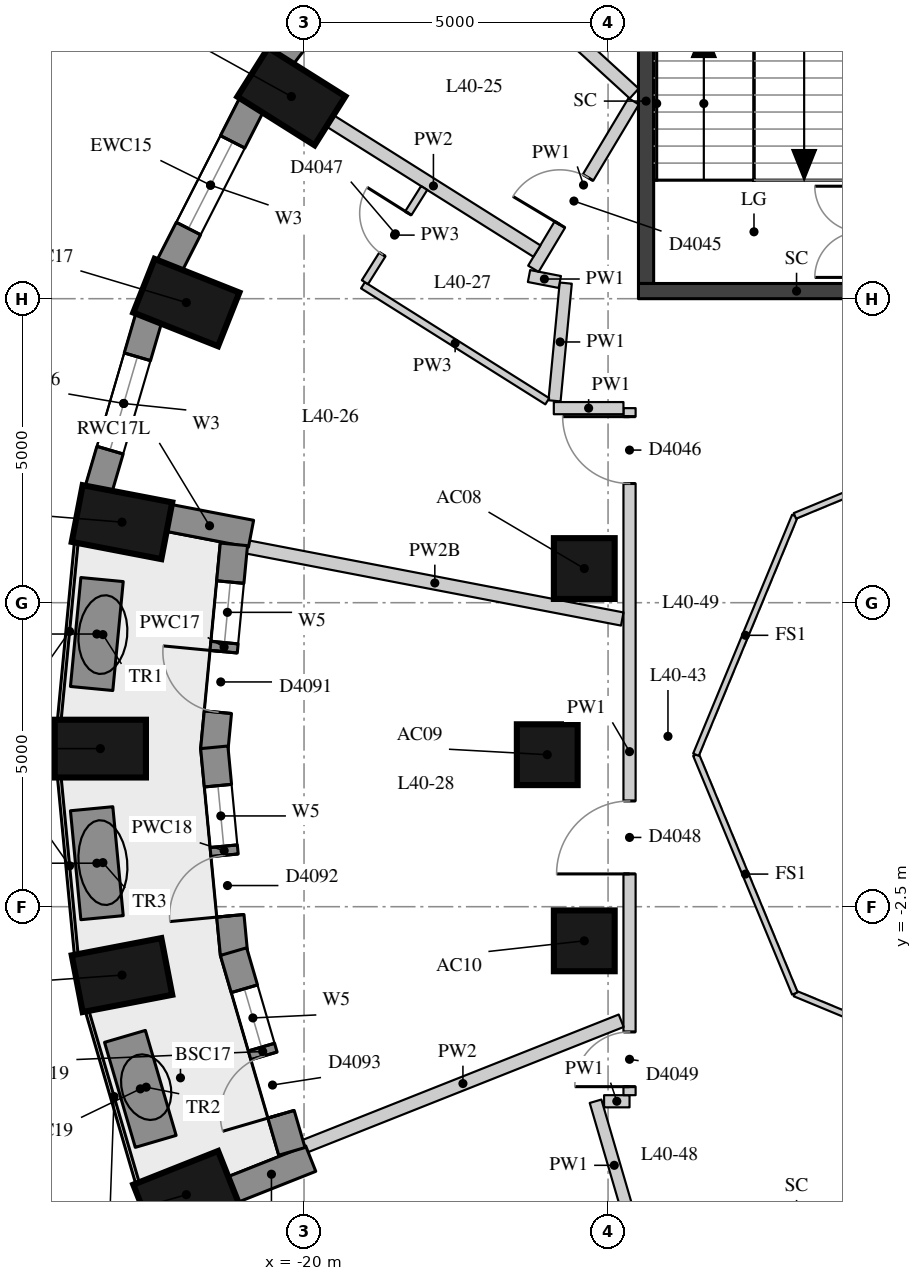
"""IFC4 building model, lengths in metres.
Left out: names, types, materials, properties, quantities, classifications, styles, units other than length and angle.
Written with IfcOpenShell. Run it as: python <this file> out.ifc"""

import sys

from ifc_helpers import new_model, si_unit, direction, frame, frame_2d, origin, origin_2d, place, context, subcontext, project, spatial, rectangle, extrude, element, fill, save


model = new_model("IFC4")
c1 = context("Model", 3, precision=1e-05, world=origin(), true_north=direction((0.0, 1.0)))
c2 = subcontext(c1, "Body", "Model", "MODEL_VIEW")
j1 = project(units=[si_unit("LENGTHUNIT", "METRE"), si_unit("PLANEANGLEUNIT", "RADIAN")], contexts=[c1])
p1 = place(None, origin())
s1 = spatial("IfcSite", under=j1, at=p1, CompositionType="ELEMENT")
p2 = place(p1, origin())
s2 = spatial("IfcBuilding", under=s1, at=p2, CompositionType="ELEMENT")
p3 = place(p2, frame((0.0, 0.0, 145.1)))
s3 = spatial("IfcBuildingStorey", under=s2, at=p3, CompositionType="ELEMENT", Elevation=145.1)
for number, where, z_axis, x_axis in (
    (1, (-20.208, 10.825, 0.0), (0.0, 0.0, 1.0), (-0.846, 0.533, 0.0)),
    (2, (-21.936, 7.436, 0.0), (0.0, 0.0, 1.0), (-0.93, 0.369, 0.0)),
    (3, (-22.994, 3.825, 0.0), (0.0, 0.0, 1.0), (-0.982, 0.189, 0.0)),
    (4, (-23.35, 0.1, 0.0), (0.0, 0.0, 1.0), (-1.0, 0.0, 0.0)),
    (5, (-22.994, -3.625, 0.0), (0.0, 0.0, 1.0), (-0.982, -0.189, 0.0)),
    (6, (-21.936, -7.236, 0.0), (0.0, 0.0, 1.0), (-0.93, -0.369, 0.0)),
):
    element("IfcColumn", number, at=place(p3, frame(where, z_axis=z_axis, x_axis=x_axis)), inside=s3, PredefinedType="COLUMN", context=c2, shape_type="SweptSolid", body=[
        extrude(rectangle(XDim=1.5, YDim=0.95, at=origin_2d()), origin(), (0.0, 0.0, 1.0), 3.3),
    ])
for number, where, z_axis, x_axis in (
    (7, (-15.391, 3.062, 0.0), (0.0, 0.0, 1.0), (1.0, 0.0, 0.0)),
    (8, (-16.0, 0.0, 0.0), (0.0, 0.0, 1.0), (1.0, 0.0, 0.0)),
    (9, (-15.391, -3.062, 0.0), (0.0, 0.0, 1.0), (1.0, 0.0, 0.0)),
):
    element("IfcColumn", number, at=place(p3, frame(where, z_axis=z_axis, x_axis=x_axis)), inside=s3, PredefinedType="COLUMN", context=c2, shape_type="SweptSolid", body=[
        extrude(rectangle(XDim=1.0, YDim=1.0, at=origin_2d()), origin(), (0.0, 0.0, 1.0), 3.3),
    ])
p4 = place(p3, frame((-18.528, 13.879, 0.0), z_axis=(0.0, 0.0, 1.0), x_axis=(-0.607817056371, -0.794077090706, 0.0)))
e10 = element("IfcWall", 10, at=p4, inside=s3, PredefinedType="SOLIDWALL", context=c2, shape_type="SweptSolid", body=[
    extrude(rectangle(XDim=3.037, YDim=0.45, at=frame_2d((1.519, 0.0))), origin(), (0.0, 0.0, 1.0), 3.02),
])
p5 = place(p4, frame((0.719, 0.0, 0.4)))
e11 = element("IfcOpeningElement", 11, at=p5, cuts=e10, PredefinedType="OPENING", context=c2, shape_type="SweptSolid", body=[
    extrude(rectangle(XDim=1.6, YDim=1.75, at=frame_2d((0.8, 0.875))), frame((0.0, 0.235, 0.0), z_axis=(0.0, -1.0, 0.0), x_axis=(1.0, 0.0, 0.0)), (0.0, 0.0, 1.0), 0.47),
])
p6 = place(p3, frame((-20.859, 10.697, 0.0), z_axis=(0.0, 0.0, 1.0), x_axis=(-0.454133999889, -0.890933392653, 0.0)))
e12 = element("IfcWall", 12, at=p6, inside=s3, PredefinedType="SOLIDWALL", context=c2, shape_type="SweptSolid", body=[
    extrude(rectangle(XDim=2.986, YDim=0.45, at=frame_2d((1.493, 0.0))), origin(), (0.0, 0.0, 1.0), 3.02),
])
p7 = place(p6, frame((0.693, 0.0, 0.4)))
e13 = element("IfcOpeningElement", 13, at=p7, cuts=e12, PredefinedType="OPENING", context=c2, shape_type="SweptSolid", body=[
    extrude(rectangle(XDim=1.6, YDim=1.75, at=frame_2d((0.8, 0.875))), frame((0.0, 0.235, 0.0), z_axis=(0.0, -1.0, 0.0), x_axis=(1.0, 0.0, 0.0)), (0.0, 0.0, 1.0), 0.47),
])
p8 = place(p3, frame((-22.551, 7.191, 0.0), z_axis=(0.0, 0.0, 1.0), x_axis=(-0.281125768296, -0.959670934435, 0.0)))
e14 = element("IfcWall", 14, at=p8, inside=s3, PredefinedType="SOLIDWALL", context=c2, shape_type="SweptSolid", body=[
    extrude(rectangle(XDim=2.948, YDim=0.45, at=frame_2d((1.474, 0.0))), origin(), (0.0, 0.0, 1.0), 3.02),
])
p9 = place(p8, frame((0.674, 0.0, 0.4)))
e15 = element("IfcOpeningElement", 15, at=p9, cuts=e14, PredefinedType="OPENING", context=c2, shape_type="SweptSolid", body=[
    extrude(rectangle(XDim=1.6, YDim=1.75, at=frame_2d((0.8, 0.875))), frame((0.0, 0.235, 0.0), z_axis=(0.0, -1.0, 0.0), x_axis=(1.0, 0.0, 0.0)), (0.0, 0.0, 1.0), 0.47),
])
p10 = place(p3, frame((-22.237, 3.896, 0.0), z_axis=(0.0, 0.0, 1.0), x_axis=(0.98204526411, -0.188645432598, 0.0)))
e16 = element("IfcWall", 16, at=p10, inside=s3, PredefinedType="SOLIDWALL", context=c2, shape_type="SweptSolid", body=[
    extrude(rectangle(XDim=1.39, YDim=0.45, at=frame_2d((0.695, 0.0))), origin(), (0.0, 0.0, 1.0), 2.57),
])
p11 = place(p3, frame((-21.182, -7.156, 0.0), z_axis=(0.0, 0.0, 1.0), x_axis=(0.929514600716, 0.368785312961, 0.0)))
e17 = element("IfcWall", 17, at=p11, inside=s3, PredefinedType="SOLIDWALL", context=c2, shape_type="SweptSolid", body=[
    extrude(rectangle(XDim=1.39, YDim=0.45, at=frame_2d((0.695, 0.0))), origin(), (0.0, 0.0, 1.0), 3.02),
])
p12 = place(p3, frame((-21.154, 3.459, 0.0), z_axis=(0.0, 0.0, 1.0), x_axis=(-0.094968544931, -0.995480273774, 0.0)))
e18 = element("IfcWall", 18, at=p12, inside=s3, PredefinedType="SOLIDWALL", context=c2, shape_type="SweptSolid", body=[
    extrude(rectangle(XDim=3.396, YDim=0.45, at=frame_2d((1.698, 0.0))), origin(), (0.0, 0.0, 1.0), 3.02),
])
p13 = place(p12, frame((0.623, 0.0, 0.4)))
e19 = element("IfcOpeningElement", 19, at=p13, cuts=e18, PredefinedType="OPENING", context=c2, shape_type="SweptSolid", body=[
    extrude(rectangle(XDim=1.0, YDim=1.75, at=frame_2d((0.5, 0.875))), frame((0.0, 0.235, 0.0), z_axis=(0.0, -1.0, 0.0), x_axis=(1.0, 0.0, 0.0)), (0.0, 0.0, 1.0), 0.47),
])
p14 = place(p12, frame((1.773, 0.0, 0.0)))
e20 = element("IfcOpeningElement", 20, at=p14, cuts=e18, PredefinedType="OPENING", context=c2, shape_type="SweptSolid", body=[
    extrude(rectangle(XDim=1.0, YDim=2.15, at=frame_2d((0.5, 1.075))), frame((0.0, 0.235, 0.0), z_axis=(0.0, -1.0, 0.0), x_axis=(1.0, 0.0, 0.0)), (0.0, 0.0, 1.0), 0.47),
])
p15 = place(p3, frame((-21.476, 0.121, 0.0), z_axis=(0.0, 0.0, 1.0), x_axis=(0.094947321258, -0.995482298279, 0.0)))
e21 = element("IfcWall", 21, at=p15, inside=s3, PredefinedType="SOLIDWALL", context=c2, shape_type="SweptSolid", body=[
    extrude(rectangle(XDim=3.417, YDim=0.45, at=frame_2d((1.708, 0.0))), origin(), (0.0, 0.0, 1.0), 3.02),
])
p16 = place(p15, frame((0.634, 0.0, 0.4)))
e22 = element("IfcOpeningElement", 22, at=p16, cuts=e21, PredefinedType="OPENING", context=c2, shape_type="SweptSolid", body=[
    extrude(rectangle(XDim=1.0, YDim=1.75, at=frame_2d((0.5, 0.875))), frame((0.0, 0.235, 0.0), z_axis=(0.0, -1.0, 0.0), x_axis=(1.0, 0.0, 0.0)), (0.0, 0.0, 1.0), 0.47),
])
p17 = place(p15, frame((1.784, 0.0, 0.0)))
e23 = element("IfcOpeningElement", 23, at=p17, cuts=e21, PredefinedType="OPENING", context=c2, shape_type="SweptSolid", body=[
    extrude(rectangle(XDim=1.0, YDim=2.15, at=frame_2d((0.5, 1.075))), frame((0.0, 0.235, 0.0), z_axis=(0.0, -1.0, 0.0), x_axis=(1.0, 0.0, 0.0)), (0.0, 0.0, 1.0), 0.47),
])
p18 = place(p3, frame((-21.159, -3.239, 0.0), z_axis=(0.0, 0.0, 1.0), x_axis=(0.280377942886, -0.959889685924, 0.0)))
e24 = element("IfcWall", 24, at=p18, inside=s3, PredefinedType="SOLIDWALL", context=c2, shape_type="SweptSolid", body=[
    extrude(rectangle(XDim=3.423, YDim=0.45, at=frame_2d((1.711, 0.0))), origin(), (0.0, 0.0, 1.0), 3.02),
])
p19 = place(p18, frame((0.636, 0.0, 0.4)))
e25 = element("IfcOpeningElement", 25, at=p19, cuts=e24, PredefinedType="OPENING", context=c2, shape_type="SweptSolid", body=[
    extrude(rectangle(XDim=1.0, YDim=1.75, at=frame_2d((0.5, 0.875))), frame((0.0, 0.235, 0.0), z_axis=(0.0, -1.0, 0.0), x_axis=(1.0, 0.0, 0.0)), (0.0, 0.0, 1.0), 0.47),
])
p20 = place(p18, frame((1.786, 0.0, 0.0)))
e26 = element("IfcOpeningElement", 26, at=p20, cuts=e24, PredefinedType="OPENING", context=c2, shape_type="SweptSolid", body=[
    extrude(rectangle(XDim=1.0, YDim=2.15, at=frame_2d((0.5, 1.075))), frame((0.0, 0.235, 0.0), z_axis=(0.0, -1.0, 0.0), x_axis=(1.0, 0.0, 0.0)), (0.0, 0.0, 1.0), 0.47),
])
for number, where, z_axis, x_axis in (
    (27, (-23.322, 2.881, 0.0), (0.0, 0.0, 1.0), (-0.095, -0.995, 0.0)),
    (28, (-23.493, -0.889, 0.0), (0.0, 0.0, 1.0), (0.095, -0.995, 0.0)),
    (29, (-22.945, -4.633, 0.0), (0.0, 0.0, 1.0), (0.281, -0.96, 0.0)),
):
    element("IfcWall", number, at=place(p3, frame(where, z_axis=z_axis, x_axis=x_axis)), inside=s3, PredefinedType="USERDEFINED", context=c2, shape_type="SweptSolid", body=[
        extrude(rectangle(XDim=1.8, YDim=0.7, at=frame_2d((0.9, 0.0))), origin(), (0.0, 0.0, 1.0), 0.75),
    ])
p21 = place(p3, frame((-14.375, 7.75, -0.28), z_axis=(0.0, 0.0, 1.0), x_axis=(0.0, 1.0, 0.0)))
e30 = element("IfcWall", 30, at=p21, inside=s3, PredefinedType="SHEAR", context=c2, shape_type="SweptSolid", body=[
    extrude(rectangle(XDim=6.0, YDim=0.25, at=frame_2d((3.0, 0.0))), origin(), (0.0, 0.0, 1.0), 3.3),
])
p22 = place(p3, frame((-14.5, 7.625, -0.28), z_axis=(0.0, 0.0, 1.0), x_axis=(1.0, 0.0, 0.0)))
e31 = element("IfcWall", 31, at=p22, inside=s3, PredefinedType="SHEAR", context=c2, shape_type="SweptSolid", body=[
    extrude(rectangle(XDim=5.2, YDim=0.25, at=frame_2d((2.6, 0.0))), origin(), (0.0, 0.0, 1.0), 3.3),
])
p23 = place(p3, frame((-14.59, -7.807, 0.0), z_axis=(0.0, 0.0, 1.0), x_axis=(-0.280401457903, 0.959882817018, 0.0)))
e32 = element("IfcWall", 32, at=p23, inside=s3, PredefinedType="PARTITIONING", context=c2, shape_type="SweptSolid", body=[
    extrude(rectangle(XDim=2.195, YDim=0.2, at=frame_2d((1.098, 0.0))), origin(), (0.0, 0.0, 1.0), 3.02),
])
p24 = place(p3, frame((-15.065, -5.7, 0.0), z_axis=(0.0, 0.0, 1.0), x_axis=(1.0, 0.0, 0.0)))
e33 = element("IfcWall", 33, at=p24, inside=s3, PredefinedType="PARTITIONING", context=c2, shape_type="SweptSolid", body=[
    extrude(rectangle(XDim=0.419, YDim=0.2, at=frame_2d((0.209, 0.0))), origin(), (0.0, 0.0, 1.0), 3.02),
])
p25 = place(p3, frame((-14.647, -5.6, 0.0), z_axis=(0.0, 0.0, 1.0), x_axis=(0.0, 1.0, 0.0)))
e34 = element("IfcWall", 34, at=p25, inside=s3, PredefinedType="PARTITIONING", context=c2, shape_type="SweptSolid", body=[
    extrude(rectangle(XDim=11.3, YDim=0.2, at=frame_2d((5.65, 0.0))), origin(), (0.0, 0.0, 1.0), 3.02),
])
p26 = place(p25, frame((10.06, 0.0, 0.0)))
e35 = element("IfcOpeningElement", 35, at=p26, cuts=e34, PredefinedType="OPENING", context=c2, shape_type="SweptSolid", body=[
    extrude(rectangle(XDim=1.1, YDim=2.1, at=frame_2d((0.55, 1.05))), frame((0.0, 0.11, 0.0), z_axis=(0.0, -1.0, 0.0), x_axis=(1.0, 0.0, 0.0)), (0.0, 0.0, 1.0), 0.22),
])
p27 = place(p25, frame((3.639, 0.0, 0.0)))
e36 = element("IfcOpeningElement", 36, at=p27, cuts=e34, PredefinedType="OPENING", context=c2, shape_type="SweptSolid", body=[
    extrude(rectangle(XDim=1.2, YDim=2.1, at=frame_2d((0.6, 1.05))), frame((0.0, 0.11, 0.0), z_axis=(0.0, -1.0, 0.0), x_axis=(1.0, 0.0, 0.0)), (0.0, 0.0, 1.0), 0.22),
])
p28 = place(p25, frame((0.14, 0.0, 0.0)))
e37 = element("IfcOpeningElement", 37, at=p28, cuts=e34, PredefinedType="OPENING", context=c2, shape_type="SweptSolid", body=[
    extrude(rectangle(XDim=0.9, YDim=2.1, at=frame_2d((0.45, 1.05))), frame((0.0, 0.11, 0.0), z_axis=(0.0, -1.0, 0.0), x_axis=(1.0, 0.0, 0.0)), (0.0, 0.0, 1.0), 0.22),
])
p29 = place(p3, frame((-14.747, 5.7, 0.0), z_axis=(0.0, 0.0, 1.0), x_axis=(-1.0, 0.0, 0.0)))
e38 = element("IfcWall", 38, at=p29, inside=s3, PredefinedType="PARTITIONING", context=c2, shape_type="SweptSolid", body=[
    extrude(rectangle(XDim=1.145, YDim=0.2, at=frame_2d((0.573, 0.0))), origin(), (0.0, 0.0, 1.0), 3.02),
])
p30 = place(p3, frame((-15.88, 5.82, 0.0), z_axis=(0.0, 0.0, 1.0), x_axis=(0.094892019157, 0.995487571344, 0.0)))
e39 = element("IfcWall", 39, at=p30, inside=s3, PredefinedType="PARTITIONING", context=c2, shape_type="SweptSolid", body=[
    extrude(rectangle(XDim=1.945, YDim=0.2, at=frame_2d((0.973, 0.0))), origin(), (0.0, 0.0, 1.0), 3.02),
])
p31 = place(p3, frame((-15.793, 7.775, 0.0), z_axis=(0.0, 0.0, 1.0), x_axis=(-0.981833914825, 0.189742361371, 0.0)))
e40 = element("IfcWall", 40, at=p31, inside=s3, PredefinedType="PARTITIONING", context=c2, shape_type="SweptSolid", body=[
    extrude(rectangle(XDim=0.516, YDim=0.2, at=frame_2d((0.258, 0.0))), origin(), (0.0, 0.0, 1.0), 3.02),
])
p32 = place(p3, frame((-16.228, 7.992, 0.0), z_axis=(0.0, 0.0, 1.0), x_axis=(0.513936465122, 0.857828251935, 0.0)))
e41 = element("IfcWall", 41, at=p32, inside=s3, PredefinedType="PARTITIONING", context=c2, shape_type="SweptSolid", body=[
    extrude(rectangle(XDim=3.21, YDim=0.2, at=frame_2d((1.605, 0.0))), origin(), (0.0, 0.0, 1.0), 3.02),
])
p33 = place(p32, frame((0.848, 0.0, 0.0)))
e42 = element("IfcOpeningElement", 42, at=p33, cuts=e41, PredefinedType="OPENING", context=c2, shape_type="SweptSolid", body=[
    extrude(rectangle(XDim=0.9, YDim=2.1, at=frame_2d((0.45, 1.05))), frame((0.0, 0.11, 0.0), z_axis=(0.0, -1.0, 0.0), x_axis=(1.0, 0.0, 0.0)), (0.0, 0.0, 1.0), 0.22),
])
p34 = place(p3, frame((-17.31, 13.382, 0.0), z_axis=(0.0, 0.0, 1.0), x_axis=(0.737860436015, -0.674953314655, 0.0)))
e43 = element("IfcWall", 43, at=p34, inside=s3, PredefinedType="PARTITIONING", context=c2, shape_type="SweptSolid", body=[
    extrude(rectangle(XDim=3.714, YDim=0.22, at=frame_2d((1.857, 0.0))), origin(), (0.0, 0.0, 1.0), 3.02),
])
p35 = place(p3, frame((-19.573, 10.426, 0.0), z_axis=(0.0, 0.0, 1.0), x_axis=(0.846298736827, -0.532708595805, 0.0)))
e44 = element("IfcWall", 44, at=p35, inside=s3, PredefinedType="PARTITIONING", context=c2, shape_type="SweptSolid", body=[
    extrude(rectangle(XDim=4.021, YDim=0.22, at=frame_2d((2.011, 0.0))), origin(), (0.0, 0.0, 1.0), 3.02),
])
p36 = place(p3, frame((-20.932, 3.417, 0.0), z_axis=(0.0, 0.0, 1.0), x_axis=(0.982023362662, -0.188759410856, 0.0)))
e45 = element("IfcWall", 45, at=p36, inside=s3, PredefinedType="PARTITIONING", context=c2, shape_type="SweptSolid", body=[
    extrude(rectangle(XDim=6.278, YDim=0.22, at=frame_2d((3.139, 0.0))), origin(), (0.0, 0.0, 1.0), 2.57),
])
p37 = place(p3, frame((-19.99, -6.441, 0.0), z_axis=(0.0, 0.0, 1.0), x_axis=(0.929507316491, 0.368803672147, 0.0)))
e46 = element("IfcWall", 46, at=p37, inside=s3, PredefinedType="PARTITIONING", context=c2, shape_type="SweptSolid", body=[
    extrude(rectangle(XDim=5.6, YDim=0.22, at=frame_2d((2.8, 0.0))), origin(), (0.0, 0.0, 1.0), 3.02),
])
p38 = place(p3, frame((-16.0, 5.813, 0.0), z_axis=(0.0, 0.0, 1.0), x_axis=(-0.846339825068, 0.53264331452, 0.0)))
e47 = element("IfcWall", 47, at=p38, inside=s3, PredefinedType="PARTITIONING", context=c2, shape_type="SweptSolid", body=[
    extrude(rectangle(XDim=3.582, YDim=0.12, at=frame_2d((1.791, 0.0))), origin(), (0.0, 0.0, 1.0), 3.02),
])
p39 = place(p3, frame((-18.999, 7.771, 0.0), z_axis=(0.0, 0.0, 1.0), x_axis=(0.532431076319, 0.84647335987, 0.0)))
e48 = element("IfcWall", 48, at=p39, inside=s3, PredefinedType="PARTITIONING", context=c2, shape_type="SweptSolid", body=[
    extrude(rectangle(XDim=1.83, YDim=0.12, at=frame_2d((0.915, 0.0))), origin(), (0.0, 0.0, 1.0), 3.02),
])
p40 = place(p39, frame((0.54, 0.0, 0.0)))
e49 = element("IfcOpeningElement", 49, at=p40, cuts=e48, PredefinedType="OPENING", context=c2, shape_type="SweptSolid", body=[
    extrude(rectangle(XDim=0.8, YDim=2.1, at=frame_2d((0.4, 1.05))), frame((0.0, 0.07, 0.0), z_axis=(0.0, -1.0, 0.0), x_axis=(1.0, 0.0, 0.0)), (0.0, 0.0, 1.0), 0.14),
])
for number, where, z_axis, x_axis in (
    (50, (-8.0, -5.554, 0.0), (0.0, 0.0, 1.0), (-0.924, 0.383, 0.0)),
    (51, (-11.927, -3.927, 0.0), (0.0, 0.0, 1.0), (-0.383, 0.924, 0.0)),
    (52, (-13.554, 0.0, 0.0), (0.0, 0.0, 1.0), (0.383, 0.924, 0.0)),
    (53, (-11.927, 3.927, 0.0), (0.0, 0.0, 1.0), (0.924, 0.383, 0.0)),
):
    element("IfcWall", number, at=place(p3, frame(where, z_axis=z_axis, x_axis=x_axis)), inside=s3, PredefinedType="PARTITIONING", context=c2, shape_type="SweptSolid", body=[
        extrude(rectangle(XDim=4.251, YDim=0.1, at=frame_2d((2.125, 0.0))), origin(), (0.0, 0.0, 1.0), 3.02),
    ])
p41 = place(p7, origin())
e54 = element("IfcWindow", 54, at=p41, inside=s3, PartitioningType="SINGLE_PANEL", PredefinedType="WINDOW", context=c2, shape_type="SweptSolid", body=[
    extrude(rectangle(XDim=1.6, YDim=1.75, at=frame_2d((0.8, 0.875))), frame((0.0, 0.035, 0.0), z_axis=(0.0, -1.0, 0.0), x_axis=(1.0, 0.0, 0.0)), (0.0, 0.0, 1.0), 0.06),
])
fill(e13, e54)
p42 = place(p9, origin())
e55 = element("IfcWindow", 55, at=p42, inside=s3, PartitioningType="SINGLE_PANEL", PredefinedType="WINDOW", context=c2, shape_type="SweptSolid", body=[
    extrude(rectangle(XDim=1.6, YDim=1.75, at=frame_2d((0.8, 0.875))), frame((0.0, 0.035, 0.0), z_axis=(0.0, -1.0, 0.0), x_axis=(1.0, 0.0, 0.0)), (0.0, 0.0, 1.0), 0.06),
])
fill(e15, e55)
p43 = place(p13, origin())
e56 = element("IfcWindow", 56, at=p43, inside=s3, PartitioningType="SINGLE_PANEL", PredefinedType="WINDOW", context=c2, shape_type="SweptSolid", body=[
    extrude(rectangle(XDim=1.0, YDim=1.75, at=frame_2d((0.5, 0.875))), frame((0.0, 0.035, 0.0), z_axis=(0.0, -1.0, 0.0), x_axis=(1.0, 0.0, 0.0)), (0.0, 0.0, 1.0), 0.06),
])
fill(e19, e56)
p44 = place(p14, frame((1.0, 0.0, 0.0), z_axis=(0.0, 0.0, 1.0), x_axis=(-1.0, 0.0, 0.0)))
e57 = element("IfcDoor", 57, at=p44, inside=s3, OperationType="SINGLE_SWING_RIGHT", PredefinedType="DOOR", context=c2, shape_type="SweptSolid", body=[
    extrude(rectangle(XDim=1.0, YDim=2.15, at=frame_2d((0.5, 1.075))), frame((0.0, 0.075, 0.0), z_axis=(0.0, -1.0, 0.0), x_axis=(1.0, 0.0, 0.0)), (0.0, 0.0, 1.0), 0.05),
])
fill(e20, e57)
p45 = place(p16, origin())
e58 = element("IfcWindow", 58, at=p45, inside=s3, PartitioningType="SINGLE_PANEL", PredefinedType="WINDOW", context=c2, shape_type="SweptSolid", body=[
    extrude(rectangle(XDim=1.0, YDim=1.75, at=frame_2d((0.5, 0.875))), frame((0.0, 0.035, 0.0), z_axis=(0.0, -1.0, 0.0), x_axis=(1.0, 0.0, 0.0)), (0.0, 0.0, 1.0), 0.06),
])
fill(e22, e58)
p46 = place(p17, frame((1.0, 0.0, 0.0), z_axis=(0.0, 0.0, 1.0), x_axis=(-1.0, 0.0, 0.0)))
e59 = element("IfcDoor", 59, at=p46, inside=s3, OperationType="SINGLE_SWING_LEFT", PredefinedType="DOOR", context=c2, shape_type="SweptSolid", body=[
    extrude(rectangle(XDim=1.0, YDim=2.15, at=frame_2d((0.5, 1.075))), frame((0.0, 0.075, 0.0), z_axis=(0.0, -1.0, 0.0), x_axis=(1.0, 0.0, 0.0)), (0.0, 0.0, 1.0), 0.05),
])
fill(e23, e59)
p47 = place(p19, origin())
e60 = element("IfcWindow", 60, at=p47, inside=s3, PartitioningType="SINGLE_PANEL", PredefinedType="WINDOW", context=c2, shape_type="SweptSolid", body=[
    extrude(rectangle(XDim=1.0, YDim=1.75, at=frame_2d((0.5, 0.875))), frame((0.0, 0.035, 0.0), z_axis=(0.0, -1.0, 0.0), x_axis=(1.0, 0.0, 0.0)), (0.0, 0.0, 1.0), 0.06),
])
fill(e25, e60)
p48 = place(p20, frame((1.0, 0.0, 0.0), z_axis=(0.0, 0.0, 1.0), x_axis=(-1.0, 0.0, 0.0)))
e61 = element("IfcDoor", 61, at=p48, inside=s3, OperationType="SINGLE_SWING_LEFT", PredefinedType="DOOR", context=c2, shape_type="SweptSolid", body=[
    extrude(rectangle(XDim=1.0, YDim=2.15, at=frame_2d((0.5, 1.075))), frame((0.0, 0.075, 0.0), z_axis=(0.0, -1.0, 0.0), x_axis=(1.0, 0.0, 0.0)), (0.0, 0.0, 1.0), 0.05),
])
fill(e26, e61)
p49 = place(p33, origin())
e62 = element("IfcDoor", 62, at=p49, inside=s3, OperationType="SINGLE_SWING_LEFT", PredefinedType="DOOR", context=c2, shape_type="SweptSolid", body=[
    extrude(rectangle(XDim=0.9, YDim=2.1, at=frame_2d((0.45, 1.05))), frame((0.0, 0.025, 0.0), z_axis=(0.0, -1.0, 0.0), x_axis=(1.0, 0.0, 0.0)), (0.0, 0.0, 1.0), 0.05),
])
fill(e42, e62)
p50 = place(p26, origin())
e63 = element("IfcDoor", 63, at=p50, inside=s3, OperationType="SINGLE_SWING_RIGHT", PredefinedType="DOOR", context=c2, shape_type="SweptSolid", body=[
    extrude(rectangle(XDim=1.1, YDim=2.1, at=frame_2d((0.55, 1.05))), frame((0.0, 0.025, 0.0), z_axis=(0.0, -1.0, 0.0), x_axis=(1.0, 0.0, 0.0)), (0.0, 0.0, 1.0), 0.05),
])
fill(e35, e63)
p51 = place(p40, origin())
e64 = element("IfcDoor", 64, at=p51, inside=s3, OperationType="SINGLE_SWING_RIGHT", PredefinedType="DOOR", context=c2, shape_type="SweptSolid", body=[
    extrude(rectangle(XDim=0.8, YDim=2.1, at=frame_2d((0.4, 1.05))), frame((0.0, 0.025, 0.0), z_axis=(0.0, -1.0, 0.0), x_axis=(1.0, 0.0, 0.0)), (0.0, 0.0, 1.0), 0.05),
])
fill(e49, e64)
p52 = place(p27, origin())
e65 = element("IfcDoor", 65, at=p52, inside=s3, OperationType="SINGLE_SWING_LEFT", PredefinedType="DOOR", context=c2, shape_type="SweptSolid", body=[
    extrude(rectangle(XDim=1.2, YDim=2.1, at=frame_2d((0.6, 1.05))), frame((0.0, 0.025, 0.0), z_axis=(0.0, -1.0, 0.0), x_axis=(1.0, 0.0, 0.0)), (0.0, 0.0, 1.0), 0.05),
])
fill(e36, e65)
p53 = place(p28, origin())
e66 = element("IfcDoor", 66, at=p53, inside=s3, OperationType="SINGLE_SWING_LEFT", PredefinedType="DOOR", context=c2, shape_type="SweptSolid", body=[
    extrude(rectangle(XDim=0.9, YDim=2.1, at=frame_2d((0.45, 1.05))), frame((0.0, 0.025, 0.0), z_axis=(0.0, -1.0, 0.0), x_axis=(1.0, 0.0, 0.0)), (0.0, 0.0, 1.0), 0.05),
])
fill(e37, e66)
save(model, sys.argv[1])
